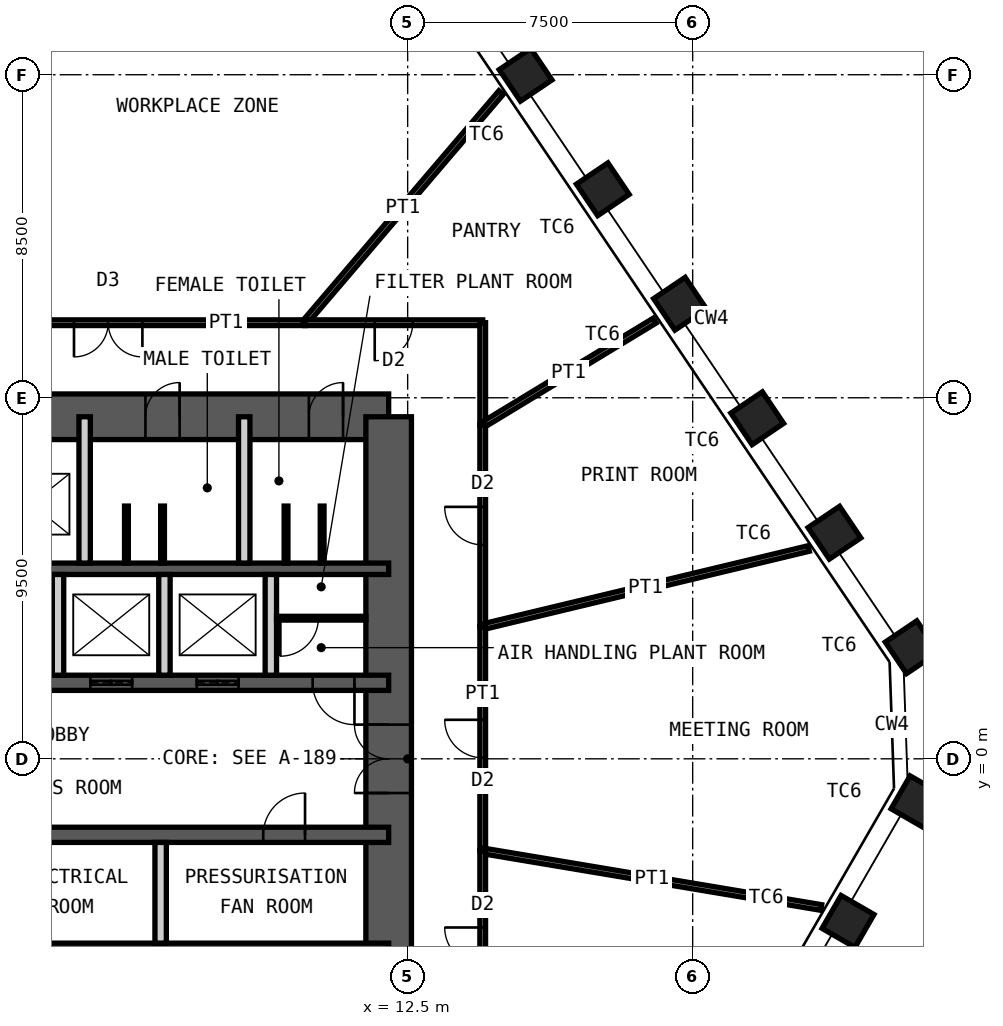
"""IFC4 building model, lengths in metres.
Left out: names, types, materials, properties, quantities, classifications, styles, units other than length and angle.
Written with IfcOpenShell. Run it as: python <this file> out.ifc"""

import sys

from ifc_helpers import new_model, si_unit, direction, frame, frame_2d, origin, origin_2d, place, context, subcontext, project, spatial, rectangle, hollow_rectangle, extrude, element, fill, save


model = new_model("IFC4")
c1 = context("Model", 3, precision=1e-05, world=origin(), true_north=direction((0.0, 1.0)))
c2 = subcontext(c1, "Body", "Model", "MODEL_VIEW")
j1 = project(units=[si_unit("LENGTHUNIT", "METRE"), si_unit("PLANEANGLEUNIT", "RADIAN")], contexts=[c1])
p1 = place(None, origin())
s1 = spatial("IfcSite", under=j1, at=p1, CompositionType="ELEMENT")
p2 = place(p1, origin())
s2 = spatial("IfcBuilding", under=s1, at=p2, CompositionType="ELEMENT")
p3 = place(p2, frame((0.0, 0.0, 243.4)))
s3 = spatial("IfcBuildingStorey", under=s2, at=p3, CompositionType="ELEMENT", Elevation=243.4)
for number, where, z_axis, x_axis in (
    (1, (15.603, 17.998, 0.0), (0.0, 0.0, 1.0), (-0.559, 0.829, 0.0)),
    (2, (17.635, 14.986, 0.0), (0.0, 0.0, 1.0), (-0.559, 0.829, 0.0)),
    (3, (19.667, 11.973, 0.0), (0.0, 0.0, 1.0), (-0.559, 0.829, 0.0)),
    (4, (21.699, 8.961, 0.0), (0.0, 0.0, 1.0), (-0.559, 0.829, 0.0)),
    (5, (23.731, 5.948, 0.0), (0.0, 0.0, 1.0), (-0.559, 0.829, 0.0)),
    (6, (25.762, 2.936, 0.0), (0.0, 0.0, 1.0), (-0.559, 0.829, 0.0)),
    (7, (25.905, -1.132, 0.0), (0.0, 0.0, 1.0), (0.5, 0.866, 0.0)),
    (8, (24.088, -4.279, 0.0), (0.0, 0.0, 1.0), (0.5, 0.866, 0.0)),
):
    element("IfcColumn", number, at=place(p3, frame(where, z_axis=z_axis, x_axis=x_axis)), inside=s3, PredefinedType="COLUMN", context=c2, shape_type="SweptSolid", body=[
        extrude(hollow_rectangle(XDim=1.0, YDim=1.0, WallThickness=0.06, at=origin_2d()), origin(), (0.0, 0.0, 1.0), 4.2),
    ])
p4 = place(p3, frame((-12.0, 9.0, 0.0), z_axis=(0.0, 0.0, 1.0), x_axis=(1.0, 0.0, 0.0)))
e9 = element("IfcWall", 9, at=p4, inside=s3, PredefinedType="SHEAR", context=c2, shape_type="SweptSolid", body=[
    extrude(rectangle(XDim=24.0, YDim=1.2, at=frame_2d((12.0, 0.0))), origin(), (0.0, 0.0, 1.0), 4.2),
])
p5 = place(p4, frame((10.4, 0.0, 0.0)))
e10 = element("IfcOpeningElement", 10, at=p5, cuts=e9, PredefinedType="OPENING", context=c2, shape_type="SweptSolid", body=[
    extrude(rectangle(XDim=1.0, YDim=2.1, at=frame_2d((0.5, 1.05))), frame((0.0, 0.61, 0.0), z_axis=(0.0, -1.0, 0.0), x_axis=(1.0, 0.0, 0.0)), (0.0, 0.0, 1.0), 1.22),
])
p6 = place(p4, frame((17.6, 0.0, 0.0)))
e11 = element("IfcOpeningElement", 11, at=p6, cuts=e9, PredefinedType="OPENING", context=c2, shape_type="SweptSolid", body=[
    extrude(rectangle(XDim=0.9, YDim=2.1, at=frame_2d((0.45, 1.05))), frame((0.0, 0.61, 0.0), z_axis=(0.0, -1.0, 0.0), x_axis=(1.0, 0.0, 0.0)), (0.0, 0.0, 1.0), 1.22),
])
p7 = place(p4, frame((21.9, 0.0, 0.0)))
e12 = element("IfcOpeningElement", 12, at=p7, cuts=e9, PredefinedType="OPENING", context=c2, shape_type="SweptSolid", body=[
    extrude(rectangle(XDim=0.9, YDim=2.1, at=frame_2d((0.45, 1.05))), frame((0.0, 0.61, 0.0), z_axis=(0.0, -1.0, 0.0), x_axis=(1.0, 0.0, 0.0)), (0.0, 0.0, 1.0), 1.22),
])
p8 = place(p3, frame((12.0, -9.0, 0.0), z_axis=(0.0, 0.0, 1.0), x_axis=(0.0, 1.0, 0.0)))
e13 = element("IfcWall", 13, at=p8, inside=s3, PredefinedType="SHEAR", context=c2, shape_type="SweptSolid", body=[
    extrude(rectangle(XDim=18.0, YDim=1.2, at=frame_2d((9.0, 0.0))), origin(), (0.0, 0.0, 1.0), 4.2),
])
p9 = place(p8, frame((8.1, 0.0, 0.0)))
e14 = element("IfcOpeningElement", 14, at=p9, cuts=e13, PredefinedType="OPENING", context=c2, shape_type="SweptSolid", body=[
    extrude(rectangle(XDim=1.8, YDim=2.1, at=frame_2d((0.9, 1.05))), frame((0.0, 0.61, 0.0), z_axis=(0.0, -1.0, 0.0), x_axis=(1.0, 0.0, 0.0)), (0.0, 0.0, 1.0), 1.22),
])
p10 = place(p3, frame((-12.0, 5.0, 0.0), z_axis=(0.0, 0.0, 1.0), x_axis=(1.0, 0.0, 0.0)))
e15 = element("IfcWall", 15, at=p10, inside=s3, PredefinedType="SHEAR", context=c2, shape_type="SweptSolid", body=[
    extrude(rectangle(XDim=24.0, YDim=0.3, at=frame_2d((12.0, 0.0))), origin(), (0.0, 0.0, 1.0), 4.2),
])
p11 = place(p3, frame((-12.0, 2.0, 0.0), z_axis=(0.0, 0.0, 1.0), x_axis=(1.0, 0.0, 0.0)))
e16 = element("IfcWall", 16, at=p11, inside=s3, PredefinedType="SHEAR", context=c2, shape_type="SweptSolid", body=[
    extrude(rectangle(XDim=24.0, YDim=0.4, at=frame_2d((12.0, 0.0))), origin(), (0.0, 0.0, 1.0), 4.2),
])
p12 = place(p11, frame((2.4, 0.0, 0.0)))
e17 = element("IfcOpeningElement", 17, at=p12, cuts=e16, PredefinedType="OPENING", context=c2, shape_type="SweptSolid", body=[
    extrude(rectangle(XDim=1.1, YDim=2.1, at=frame_2d((0.55, 1.05))), frame((0.0, 0.21, 0.0), z_axis=(0.0, -1.0, 0.0), x_axis=(1.0, 0.0, 0.0)), (0.0, 0.0, 1.0), 0.42),
])
p13 = place(p11, frame((22.0, 0.0, 0.0)))
e18 = element("IfcOpeningElement", 18, at=p13, cuts=e16, PredefinedType="OPENING", context=c2, shape_type="SweptSolid", body=[
    extrude(rectangle(XDim=1.1, YDim=2.1, at=frame_2d((0.55, 1.05))), frame((0.0, 0.21, 0.0), z_axis=(0.0, -1.0, 0.0), x_axis=(1.0, 0.0, 0.0)), (0.0, 0.0, 1.0), 0.42),
])
p14 = place(p11, frame((10.15, 0.0, 0.0)))
e19 = element("IfcOpeningElement", 19, at=p14, cuts=e16, PredefinedType="OPENING", context=c2, shape_type="SweptSolid", body=[
    extrude(rectangle(XDim=1.0, YDim=2.1, at=frame_2d((0.5, 1.05))), frame((0.0, 0.21, 0.0), z_axis=(0.0, -1.0, 0.0), x_axis=(1.0, 0.0, 0.0)), (0.0, 0.0, 1.0), 0.42),
])
p15 = place(p11, frame((6.9, 0.0, 0.0)))
e20 = element("IfcOpeningElement", 20, at=p15, cuts=e16, PredefinedType="OPENING", context=c2, shape_type="SweptSolid", body=[
    extrude(rectangle(XDim=1.0, YDim=2.1, at=frame_2d((0.5, 1.05))), frame((0.0, 0.21, 0.0), z_axis=(0.0, -1.0, 0.0), x_axis=(1.0, 0.0, 0.0)), (0.0, 0.0, 1.0), 0.42),
])
p16 = place(p11, frame((13.35, 0.0, 0.0)))
e21 = element("IfcOpeningElement", 21, at=p16, cuts=e16, PredefinedType="OPENING", context=c2, shape_type="SweptSolid", body=[
    extrude(rectangle(XDim=1.1, YDim=2.4, at=frame_2d((0.55, 1.2))), frame((0.0, 0.21, 0.0), z_axis=(0.0, -1.0, 0.0), x_axis=(1.0, 0.0, 0.0)), (0.0, 0.0, 1.0), 0.42),
])
p17 = place(p11, frame((16.15, 0.0, 0.0)))
e22 = element("IfcOpeningElement", 22, at=p17, cuts=e16, PredefinedType="OPENING", context=c2, shape_type="SweptSolid", body=[
    extrude(rectangle(XDim=1.1, YDim=2.4, at=frame_2d((0.55, 1.2))), frame((0.0, 0.21, 0.0), z_axis=(0.0, -1.0, 0.0), x_axis=(1.0, 0.0, 0.0)), (0.0, 0.0, 1.0), 0.42),
])
p18 = place(p11, frame((18.95, 0.0, 0.0)))
e23 = element("IfcOpeningElement", 23, at=p18, cuts=e16, PredefinedType="OPENING", context=c2, shape_type="SweptSolid", body=[
    extrude(rectangle(XDim=1.1, YDim=2.4, at=frame_2d((0.55, 1.2))), frame((0.0, 0.21, 0.0), z_axis=(0.0, -1.0, 0.0), x_axis=(1.0, 0.0, 0.0)), (0.0, 0.0, 1.0), 0.42),
])
p19 = place(p3, frame((-12.0, -2.0, 0.0), z_axis=(0.0, 0.0, 1.0), x_axis=(1.0, 0.0, 0.0)))
e24 = element("IfcWall", 24, at=p19, inside=s3, PredefinedType="SHEAR", context=c2, shape_type="SweptSolid", body=[
    extrude(rectangle(XDim=24.0, YDim=0.4, at=frame_2d((12.0, 0.0))), origin(), (0.0, 0.0, 1.0), 4.2),
])
p20 = place(p19, frame((1.1, 0.0, 0.0)))
e25 = element("IfcOpeningElement", 25, at=p20, cuts=e24, PredefinedType="OPENING", context=c2, shape_type="SweptSolid", body=[
    extrude(rectangle(XDim=1.1, YDim=2.1, at=frame_2d((0.55, 1.05))), frame((0.0, 0.21, 0.0), z_axis=(0.0, -1.0, 0.0), x_axis=(1.0, 0.0, 0.0)), (0.0, 0.0, 1.0), 0.42),
])
p21 = place(p19, frame((13.55, 0.0, 0.0)))
e26 = element("IfcOpeningElement", 26, at=p21, cuts=e24, PredefinedType="OPENING", context=c2, shape_type="SweptSolid", body=[
    extrude(rectangle(XDim=1.1, YDim=2.1, at=frame_2d((0.55, 1.05))), frame((0.0, 0.21, 0.0), z_axis=(0.0, -1.0, 0.0), x_axis=(1.0, 0.0, 0.0)), (0.0, 0.0, 1.0), 0.42),
])
p22 = place(p19, frame((20.7, 0.0, 0.0)))
e27 = element("IfcOpeningElement", 27, at=p22, cuts=e24, PredefinedType="OPENING", context=c2, shape_type="SweptSolid", body=[
    extrude(rectangle(XDim=1.1, YDim=2.1, at=frame_2d((0.55, 1.05))), frame((0.0, 0.21, 0.0), z_axis=(0.0, -1.0, 0.0), x_axis=(1.0, 0.0, 0.0)), (0.0, 0.0, 1.0), 0.42),
])
p23 = place(p19, frame((4.0, 0.0, 0.0)))
e28 = element("IfcOpeningElement", 28, at=p23, cuts=e24, PredefinedType="OPENING", context=c2, shape_type="SweptSolid", body=[
    extrude(rectangle(XDim=1.0, YDim=2.1, at=frame_2d((0.5, 1.05))), frame((0.0, 0.21, 0.0), z_axis=(0.0, -1.0, 0.0), x_axis=(1.0, 0.0, 0.0)), (0.0, 0.0, 1.0), 0.42),
])
p24 = place(p19, frame((6.8, 0.0, 0.0)))
e29 = element("IfcOpeningElement", 29, at=p24, cuts=e24, PredefinedType="OPENING", context=c2, shape_type="SweptSolid", body=[
    extrude(rectangle(XDim=1.0, YDim=2.1, at=frame_2d((0.5, 1.05))), frame((0.0, 0.21, 0.0), z_axis=(0.0, -1.0, 0.0), x_axis=(1.0, 0.0, 0.0)), (0.0, 0.0, 1.0), 0.42),
])
p25 = place(p3, frame((-12.0, -5.0, 0.0), z_axis=(0.0, 0.0, 1.0), x_axis=(1.0, 0.0, 0.0)))
e30 = element("IfcWall", 30, at=p25, inside=s3, PredefinedType="SHEAR", context=c2, shape_type="SweptSolid", body=[
    extrude(rectangle(XDim=24.0, YDim=0.3, at=frame_2d((12.0, 0.0))), origin(), (0.0, 0.0, 1.0), 4.2),
])
for number, where, z_axis, x_axis in (
    (31, (4.0, 5.15, 0.0), (0.0, 0.0, 1.0), (0.0, 1.0, 0.0)),
    (32, (8.2, 5.15, 0.0), (0.0, 0.0, 1.0), (0.0, 1.0, 0.0)),
):
    element("IfcWall", number, at=place(p3, frame(where, z_axis=z_axis, x_axis=x_axis)), inside=s3, PredefinedType="PARTITIONING", context=c2, shape_type="SweptSolid", body=[
        extrude(rectangle(XDim=3.85, YDim=0.3, at=frame_2d((1.925, 0.0))), origin(), (0.0, 0.0, 1.0), 3.98),
    ])
for number, where, z_axis, x_axis in (
    (33, (3.3, 2.2, 0.0), (0.0, 0.0, 1.0), (0.0, 1.0, 0.0)),
    (34, (6.1, 2.2, 0.0), (0.0, 0.0, 1.0), (0.0, 1.0, 0.0)),
    (35, (8.9, 2.2, 0.0), (0.0, 0.0, 1.0), (0.0, 1.0, 0.0)),
    (36, (6.0, -4.85, 0.0), (0.0, 0.0, 1.0), (0.0, 1.0, 0.0)),
):
    element("IfcWall", number, at=place(p3, frame(where, z_axis=z_axis, x_axis=x_axis)), inside=s3, PredefinedType="PARTITIONING", context=c2, shape_type="SweptSolid", body=[
        extrude(rectangle(XDim=2.65, YDim=0.3, at=frame_2d((1.325, 0.0))), origin(), (0.0, 0.0, 1.0), 3.98),
    ])
p26 = place(p3, frame((9.05, 3.7, 0.0), z_axis=(0.0, 0.0, 1.0), x_axis=(1.0, 0.0, 0.0)))
e37 = element("IfcWall", 37, at=p26, inside=s3, PredefinedType="PARTITIONING", context=c2, shape_type="SweptSolid", body=[
    extrude(rectangle(XDim=2.35, YDim=0.1, at=frame_2d((1.175, 0.0))), origin(), (0.0, 0.0, 1.0), 3.98),
])
p27 = place(p26, frame((0.1, 0.0, 0.0)))
e38 = element("IfcOpeningElement", 38, at=p27, cuts=e37, PredefinedType="OPENING", context=c2, shape_type="SweptSolid", body=[
    extrude(rectangle(XDim=1.0, YDim=2.4, at=frame_2d((0.5, 1.2))), frame((0.0, 0.06, 0.0), z_axis=(0.0, -1.0, 0.0), x_axis=(1.0, 0.0, 0.0)), (0.0, 0.0, 1.0), 0.12),
])
for number, where, z_axis, x_axis in (
    (39, (5.1, 5.15, 0.0), (0.0, 0.0, 1.0), (0.0, 1.0, 0.0)),
    (40, (6.05, 5.15, 0.0), (0.0, 0.0, 1.0), (0.0, 1.0, 0.0)),
    (41, (9.3, 5.15, 0.0), (0.0, 0.0, 1.0), (0.0, 1.0, 0.0)),
    (42, (10.25, 5.15, 0.0), (0.0, 0.0, 1.0), (0.0, 1.0, 0.0)),
):
    element("IfcWall", number, at=place(p3, frame(where, z_axis=z_axis, x_axis=x_axis)), inside=s3, PredefinedType="PARTITIONING", context=c2, shape_type="SweptSolid", body=[
        extrude(rectangle(XDim=1.5, YDim=0.1, at=frame_2d((0.75, 0.0))), origin(), (0.0, 0.0, 1.0), 2.1),
    ])
p28 = place(p3, frame((-0.551, 11.475, 0.0), z_axis=(0.0, 0.0, 1.0), x_axis=(1.0, 0.0, 0.0)))
e43 = element("IfcWall", 43, at=p28, inside=s3, PredefinedType="PARTITIONING", context=c2, shape_type="SweptSolid", body=[
    extrude(rectangle(XDim=10.342, YDim=0.15, at=frame_2d((5.171, 0.0))), origin(), (0.0, 0.0, 1.0), 4.03),
])
p29 = place(p28, frame((4.271, 0.0, 0.0)))
e44 = element("IfcOpeningElement", 44, at=p29, cuts=e43, PredefinedType="OPENING", context=c2, shape_type="SweptSolid", body=[
    extrude(rectangle(XDim=1.8, YDim=2.4, at=frame_2d((0.9, 1.2))), frame((0.0, 0.085, 0.0), z_axis=(0.0, -1.0, 0.0), x_axis=(1.0, 0.0, 0.0)), (0.0, 0.0, 1.0), 0.17),
])
p30 = place(p3, frame((14.958, 17.531, 0.0), z_axis=(0.0, 0.0, 1.0), x_axis=(-0.649097500837, -0.760705221756, 0.0)))
e45 = element("IfcWall", 45, at=p30, inside=s3, PredefinedType="PARTITIONING", context=c2, shape_type="SweptSolid", body=[
    extrude(rectangle(XDim=7.96, YDim=0.15, at=frame_2d((3.98, 0.0))), origin(), (0.0, 0.0, 1.0), 3.43),
])
p31 = place(p3, frame((9.791, 11.475, 0.0), z_axis=(0.0, 0.0, 1.0), x_axis=(1.0, 0.0, 0.0)))
e46 = element("IfcWall", 46, at=p31, inside=s3, PredefinedType="PARTITIONING", context=c2, shape_type="SweptSolid", body=[
    extrude(rectangle(XDim=4.684, YDim=0.15, at=frame_2d((2.342, 0.0))), origin(), (0.0, 0.0, 1.0), 4.03),
])
p32 = place(p31, frame((1.842, 0.0, 0.0)))
e47 = element("IfcOpeningElement", 47, at=p32, cuts=e46, PredefinedType="OPENING", context=c2, shape_type="SweptSolid", body=[
    extrude(rectangle(XDim=1.0, YDim=2.4, at=frame_2d((0.5, 1.2))), frame((0.0, 0.085, 0.0), z_axis=(0.0, -1.0, 0.0), x_axis=(1.0, 0.0, 0.0)), (0.0, 0.0, 1.0), 0.17),
])
p33 = place(p3, frame((14.475, 11.475, 0.0), z_axis=(0.0, 0.0, 1.0), x_axis=(0.0, -1.0, 0.0)))
e48 = element("IfcWall", 48, at=p33, inside=s3, PredefinedType="PARTITIONING", context=c2, shape_type="SweptSolid", body=[
    extrude(rectangle(XDim=2.692, YDim=0.15, at=frame_2d((1.346, 0.0))), origin(), (0.0, 0.0, 1.0), 4.03),
])
p34 = place(p3, frame((19.001, 11.53, 0.0), z_axis=(0.0, 0.0, 1.0), x_axis=(-0.854906581035, -0.518781975114, 0.0)))
e49 = element("IfcWall", 49, at=p34, inside=s3, PredefinedType="PARTITIONING", context=c2, shape_type="SweptSolid", body=[
    extrude(rectangle(XDim=5.294, YDim=0.15, at=frame_2d((2.647, 0.0))), origin(), (0.0, 0.0, 1.0), 3.43),
])
p35 = place(p3, frame((14.475, 8.783, 0.0), z_axis=(0.0, 0.0, 1.0), x_axis=(0.0, -1.0, 0.0)))
e50 = element("IfcWall", 50, at=p35, inside=s3, PredefinedType="PARTITIONING", context=c2, shape_type="SweptSolid", body=[
    extrude(rectangle(XDim=5.309, YDim=0.15, at=frame_2d((2.654, 0.0))), origin(), (0.0, 0.0, 1.0), 4.03),
])
p36 = place(p35, frame((2.154, 0.0, 0.0)))
e51 = element("IfcOpeningElement", 51, at=p36, cuts=e50, PredefinedType="OPENING", context=c2, shape_type="SweptSolid", body=[
    extrude(rectangle(XDim=1.0, YDim=2.4, at=frame_2d((0.5, 1.2))), frame((0.0, 0.085, 0.0), z_axis=(0.0, -1.0, 0.0), x_axis=(1.0, 0.0, 0.0)), (0.0, 0.0, 1.0), 0.17),
])
p37 = place(p3, frame((23.053, 5.534, 0.0), z_axis=(0.0, 0.0, 1.0), x_axis=(-0.972377252501, -0.233414821335, 0.0)))
e52 = element("IfcWall", 52, at=p37, inside=s3, PredefinedType="PARTITIONING", context=c2, shape_type="SweptSolid", body=[
    extrude(rectangle(XDim=8.822, YDim=0.15, at=frame_2d((4.411, 0.0))), origin(), (0.0, 0.0, 1.0), 3.43),
])
p38 = place(p3, frame((14.475, 3.475, 0.0), z_axis=(0.0, 0.0, 1.0), x_axis=(0.0, -1.0, 0.0)))
e53 = element("IfcWall", 53, at=p38, inside=s3, PredefinedType="PARTITIONING", context=c2, shape_type="SweptSolid", body=[
    extrude(rectangle(XDim=5.896, YDim=0.15, at=frame_2d((2.948, 0.0))), origin(), (0.0, 0.0, 1.0), 4.03),
])
p39 = place(p38, frame((2.448, 0.0, 0.0)))
e54 = element("IfcOpeningElement", 54, at=p39, cuts=e53, PredefinedType="OPENING", context=c2, shape_type="SweptSolid", body=[
    extrude(rectangle(XDim=1.0, YDim=2.4, at=frame_2d((0.5, 1.2))), frame((0.0, 0.085, 0.0), z_axis=(0.0, -1.0, 0.0), x_axis=(1.0, 0.0, 0.0)), (0.0, 0.0, 1.0), 0.17),
])
p40 = place(p3, frame((23.383, -3.912, 0.0), z_axis=(0.0, 0.0, 1.0), x_axis=(-0.986293651891, 0.164999491631, 0.0)))
e55 = element("IfcWall", 55, at=p40, inside=s3, PredefinedType="PARTITIONING", context=c2, shape_type="SweptSolid", body=[
    extrude(rectangle(XDim=9.032, YDim=0.15, at=frame_2d((4.516, 0.0))), origin(), (0.0, 0.0, 1.0), 3.43),
])
p41 = place(p3, frame((14.475, -2.422, 0.0), z_axis=(0.0, 0.0, 1.0), x_axis=(0.0, -1.0, 0.0)))
e56 = element("IfcWall", 56, at=p41, inside=s3, PredefinedType="PARTITIONING", context=c2, shape_type="SweptSolid", body=[
    extrude(rectangle(XDim=5.033, YDim=0.15, at=frame_2d((2.517, 0.0))), origin(), (0.0, 0.0, 1.0), 4.03),
])
p42 = place(p41, frame((2.017, 0.0, 0.0)))
e57 = element("IfcOpeningElement", 57, at=p42, cuts=e56, PredefinedType="OPENING", context=c2, shape_type="SweptSolid", body=[
    extrude(rectangle(XDim=1.0, YDim=2.4, at=frame_2d((0.5, 1.2))), frame((0.0, 0.085, 0.0), z_axis=(0.0, -1.0, 0.0), x_axis=(1.0, 0.0, 0.0)), (0.0, 0.0, 1.0), 0.17),
])
p43 = place(p6, origin())
e58 = element("IfcDoor", 58, at=p43, inside=s3, OperationType="SINGLE_SWING_LEFT", PredefinedType="DOOR", context=c2, shape_type="SweptSolid", body=[
    extrude(rectangle(XDim=0.9, YDim=2.1, at=frame_2d((0.45, 1.05))), frame((0.0, 0.025, 0.0), z_axis=(0.0, -1.0, 0.0), x_axis=(1.0, 0.0, 0.0)), (0.0, 0.0, 1.0), 0.05),
])
fill(e11, e58)
p44 = place(p7, origin())
e59 = element("IfcDoor", 59, at=p44, inside=s3, OperationType="SINGLE_SWING_LEFT", PredefinedType="DOOR", context=c2, shape_type="SweptSolid", body=[
    extrude(rectangle(XDim=0.9, YDim=2.1, at=frame_2d((0.45, 1.05))), frame((0.0, 0.025, 0.0), z_axis=(0.0, -1.0, 0.0), x_axis=(1.0, 0.0, 0.0)), (0.0, 0.0, 1.0), 0.05),
])
fill(e12, e59)
p45 = place(p13, origin())
e60 = element("IfcDoor", 60, at=p45, inside=s3, OperationType="SINGLE_SWING_RIGHT", PredefinedType="DOOR", context=c2, shape_type="SweptSolid", body=[
    extrude(rectangle(XDim=1.1, YDim=2.1, at=frame_2d((0.55, 1.05))), frame((0.0, 0.025, 0.0), z_axis=(0.0, -1.0, 0.0), x_axis=(1.0, 0.0, 0.0)), (0.0, 0.0, 1.0), 0.05),
])
fill(e18, e60)
p46 = place(p22, origin())
e61 = element("IfcDoor", 61, at=p46, inside=s3, OperationType="SINGLE_SWING_LEFT", PredefinedType="DOOR", context=c2, shape_type="SweptSolid", body=[
    extrude(rectangle(XDim=1.1, YDim=2.1, at=frame_2d((0.55, 1.05))), frame((0.0, 0.025, 0.0), z_axis=(0.0, -1.0, 0.0), x_axis=(1.0, 0.0, 0.0)), (0.0, 0.0, 1.0), 0.05),
])
fill(e27, e61)
p47 = place(p9, origin())
e62 = element("IfcDoor", 62, at=p47, inside=s3, OperationType="DOUBLE_DOOR_DOUBLE_SWING", PredefinedType="DOOR", context=c2, shape_type="SweptSolid", body=[
    extrude(rectangle(XDim=1.8, YDim=2.1, at=frame_2d((0.9, 1.05))), frame((0.0, 0.025, 0.0), z_axis=(0.0, -1.0, 0.0), x_axis=(1.0, 0.0, 0.0)), (0.0, 0.0, 1.0), 0.05),
])
fill(e14, e62)
p48 = place(p17, origin())
e63 = element("IfcDoor", 63, at=p48, inside=s3, OperationType="DOUBLE_DOOR_SLIDING", PredefinedType="DOOR", context=c2, shape_type="SweptSolid", body=[
    extrude(rectangle(XDim=1.1, YDim=2.4, at=frame_2d((0.55, 1.2))), frame((0.0, 0.025, 0.0), z_axis=(0.0, -1.0, 0.0), x_axis=(1.0, 0.0, 0.0)), (0.0, 0.0, 1.0), 0.05),
])
fill(e22, e63)
p49 = place(p18, origin())
e64 = element("IfcDoor", 64, at=p49, inside=s3, OperationType="DOUBLE_DOOR_SLIDING", PredefinedType="DOOR", context=c2, shape_type="SweptSolid", body=[
    extrude(rectangle(XDim=1.1, YDim=2.4, at=frame_2d((0.55, 1.2))), frame((0.0, 0.025, 0.0), z_axis=(0.0, -1.0, 0.0), x_axis=(1.0, 0.0, 0.0)), (0.0, 0.0, 1.0), 0.05),
])
fill(e23, e64)
p50 = place(p27, origin())
e65 = element("IfcDoor", 65, at=p50, inside=s3, OperationType="SINGLE_SWING_LEFT", PredefinedType="DOOR", context=c2, shape_type="SweptSolid", body=[
    extrude(rectangle(XDim=1.0, YDim=2.4, at=frame_2d((0.5, 1.2))), frame((0.0, 0.025, 0.0), z_axis=(0.0, -1.0, 0.0), x_axis=(1.0, 0.0, 0.0)), (0.0, 0.0, 1.0), 0.05),
])
fill(e38, e65)
p51 = place(p29, origin())
e66 = element("IfcDoor", 66, at=p51, inside=s3, OperationType="DOUBLE_DOOR_DOUBLE_SWING", PredefinedType="DOOR", context=c2, shape_type="SweptSolid", body=[
    extrude(rectangle(XDim=1.8, YDim=2.4, at=frame_2d((0.9, 1.2))), frame((0.0, 0.025, 0.0), z_axis=(0.0, -1.0, 0.0), x_axis=(1.0, 0.0, 0.0)), (0.0, 0.0, 1.0), 0.05),
])
fill(e44, e66)
p52 = place(p32, origin())
e67 = element("IfcDoor", 67, at=p52, inside=s3, OperationType="SINGLE_SWING_LEFT", PredefinedType="DOOR", context=c2, shape_type="SweptSolid", body=[
    extrude(rectangle(XDim=1.0, YDim=2.4, at=frame_2d((0.5, 1.2))), frame((0.0, 0.025, 0.0), z_axis=(0.0, -1.0, 0.0), x_axis=(1.0, 0.0, 0.0)), (0.0, 0.0, 1.0), 0.05),
])
fill(e47, e67)
p53 = place(p36, origin())
e68 = element("IfcDoor", 68, at=p53, inside=s3, OperationType="SINGLE_SWING_LEFT", PredefinedType="DOOR", context=c2, shape_type="SweptSolid", body=[
    extrude(rectangle(XDim=1.0, YDim=2.4, at=frame_2d((0.5, 1.2))), frame((0.0, 0.025, 0.0), z_axis=(0.0, -1.0, 0.0), x_axis=(1.0, 0.0, 0.0)), (0.0, 0.0, 1.0), 0.05),
])
fill(e51, e68)
p54 = place(p39, origin())
e69 = element("IfcDoor", 69, at=p54, inside=s3, OperationType="SINGLE_SWING_LEFT", PredefinedType="DOOR", context=c2, shape_type="SweptSolid", body=[
    extrude(rectangle(XDim=1.0, YDim=2.4, at=frame_2d((0.5, 1.2))), frame((0.0, 0.025, 0.0), z_axis=(0.0, -1.0, 0.0), x_axis=(1.0, 0.0, 0.0)), (0.0, 0.0, 1.0), 0.05),
])
fill(e54, e69)
p55 = place(p42, origin())
e70 = element("IfcDoor", 70, at=p55, inside=s3, OperationType="SINGLE_SWING_LEFT", PredefinedType="DOOR", context=c2, shape_type="SweptSolid", body=[
    extrude(rectangle(XDim=1.0, YDim=2.4, at=frame_2d((0.5, 1.2))), frame((0.0, 0.025, 0.0), z_axis=(0.0, -1.0, 0.0), x_axis=(1.0, 0.0, 0.0)), (0.0, 0.0, 1.0), 0.05),
])
fill(e57, e70)
save(model, sys.argv[1])
